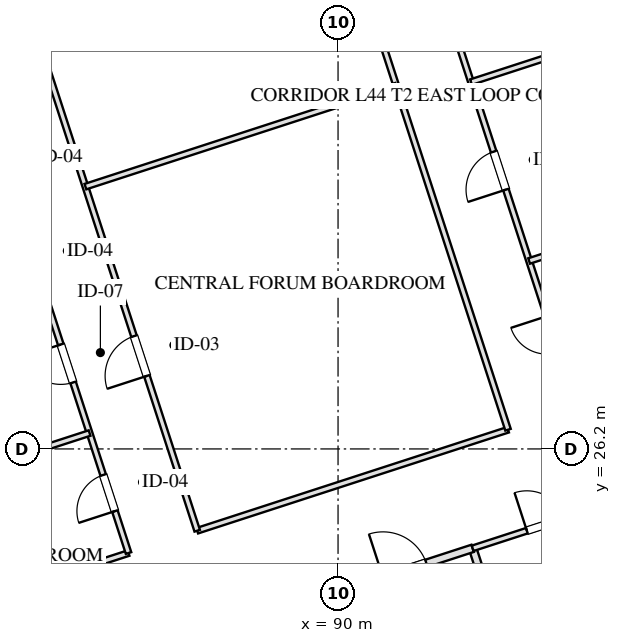
"""IFC4 building model, lengths in metres.
Left out: names, types, materials, properties, quantities, classifications, styles, units other than length and angle.
Written with IfcOpenShell. Run it as: python <this file> out.ifc"""

import sys

from ifc_helpers import new_model, si_unit, direction, frame, frame_2d, origin, place, context, subcontext, project, spatial, rectangle, extrude, element, fill, save


model = new_model("IFC4")
c1 = context("Model", 3, precision=1e-05, world=origin(), true_north=direction((0.0, 1.0)))
c2 = subcontext(c1, "Body", "Model", "MODEL_VIEW")
j1 = project(units=[si_unit("LENGTHUNIT", "METRE"), si_unit("PLANEANGLEUNIT", "RADIAN")], contexts=[c1])
p1 = place(None, origin())
s1 = spatial("IfcSite", under=j1, at=p1, CompositionType="ELEMENT")
p2 = place(p1, origin())
s2 = spatial("IfcBuilding", under=s1, at=p2, CompositionType="ELEMENT")
p3 = place(p2, frame((0.0, 0.0, 166.75)))
s3 = spatial("IfcBuildingStorey", under=s2, at=p3, CompositionType="ELEMENT", Elevation=166.75)
p4 = place(p3, frame((93.542, 23.585, 0.0), z_axis=(0.0, 0.0, 1.0), x_axis=(0.309042196757, -0.951048327176, 0.0)))
e1 = element("IfcWall", 1, at=p4, inside=s3, PredefinedType="PARTITIONING", context=c2, shape_type="SweptSolid", body=[
    extrude(rectangle(XDim=8.43, YDim=0.2, at=frame_2d((4.215, 0.0))), origin(), (0.0, 0.0, 1.0), 3.175),
])
p5 = place(p3, frame((89.899, 22.401, 0.0), z_axis=(0.0, 0.0, 1.0), x_axis=(0.951046716504, 0.309047153403, 0.0)))
e2 = element("IfcWall", 2, at=p5, inside=s3, PredefinedType="PARTITIONING", context=c2, shape_type="SweptSolid", body=[
    extrude(rectangle(XDim=3.83, YDim=0.2, at=frame_2d((1.915, 0.0))), origin(), (0.0, 0.0, 1.0), 3.175),
])
p6 = place(p5, frame((1.35, 0.0, 0.0)))
e3 = element("IfcOpeningElement", 3, at=p6, cuts=e2, PredefinedType="OPENING", context=c2, shape_type="SweptSolid", body=[
    extrude(rectangle(XDim=1.2, YDim=2.05, at=frame_2d((0.6, 1.025))), frame((0.0, 0.11, 0.0), z_axis=(0.0, -1.0, 0.0), x_axis=(1.0, 0.0, 0.0)), (0.0, 0.0, 1.0), 0.22),
])
p7 = place(p3, frame((93.542, 23.585, 0.0), z_axis=(0.0, 0.0, 1.0), x_axis=(0.951063829732, 0.308994485023, 0.0)))
e4 = element("IfcWall", 4, at=p7, inside=s3, PredefinedType="PARTITIONING", context=c2, shape_type="SweptSolid", body=[
    extrude(rectangle(XDim=4.4, YDim=0.15, at=frame_2d((2.2, 0.0))), origin(), (0.0, 0.0, 1.0), 3.175),
])
p8 = place(p7, frame((1.5, 0.0, 0.0)))
e5 = element("IfcOpeningElement", 5, at=p8, cuts=e4, PredefinedType="OPENING", context=c2, shape_type="SweptSolid", body=[
    extrude(rectangle(XDim=1.05, YDim=2.05, at=frame_2d((0.525, 1.025))), frame((0.0, 0.085, 0.0), z_axis=(0.0, -1.0, 0.0), x_axis=(1.0, 0.0, 0.0)), (0.0, 0.0, 1.0), 0.17),
])
p9 = place(p3, frame((77.925, 21.328, 0.0), z_axis=(0.0, 0.0, 1.0), x_axis=(0.951061887302, 0.309000463626, 0.0)))
e6 = element("IfcWall", 6, at=p9, inside=s3, PredefinedType="PARTITIONING", context=c2, shape_type="SweptSolid", body=[
    extrude(rectangle(XDim=6.9, YDim=0.15, at=frame_2d((3.45, 0.0))), origin(), (0.0, 0.0, 1.0), 3.175),
])
p10 = place(p3, frame((86.294, 24.048, 0.0), z_axis=(0.0, 0.0, 1.0), x_axis=(0.951052008164, 0.309030868631, 0.0)))
e7 = element("IfcWall", 7, at=p10, inside=s3, PredefinedType="PARTITIONING", context=c2, shape_type="SweptSolid", body=[
    extrude(rectangle(XDim=8.6, YDim=0.15, at=frame_2d((4.3, 0.0))), origin(), (0.0, 0.0, 1.0), 3.175),
])
p11 = place(p3, frame((84.487, 23.46, 0.0), z_axis=(0.0, 0.0, 1.0), x_axis=(-0.30901773025, 0.951056277195, 0.0)))
e8 = element("IfcWall", 8, at=p11, inside=s3, PredefinedType="PARTITIONING", context=c2, shape_type="SweptSolid", body=[
    extrude(rectangle(XDim=16.64, YDim=0.15, at=frame_2d((8.32, 0.0))), origin(), (0.0, 0.0, 1.0), 3.175),
])
p12 = place(p11, frame((1.16, 0.0, 0.0)))
e9 = element("IfcOpeningElement", 9, at=p12, cuts=e8, PredefinedType="OPENING", context=c2, shape_type="SweptSolid", body=[
    extrude(rectangle(XDim=1.0, YDim=2.05, at=frame_2d((0.5, 1.025))), frame((0.0, 0.085, 0.0), z_axis=(0.0, -1.0, 0.0), x_axis=(1.0, 0.0, 0.0)), (0.0, 0.0, 1.0), 0.17),
])
p13 = place(p11, frame((4.72, 0.0, 0.0)))
e10 = element("IfcOpeningElement", 10, at=p13, cuts=e8, PredefinedType="OPENING", context=c2, shape_type="SweptSolid", body=[
    extrude(rectangle(XDim=1.05, YDim=2.05, at=frame_2d((0.525, 1.025))), frame((0.0, 0.085, 0.0), z_axis=(0.0, -1.0, 0.0), x_axis=(1.0, 0.0, 0.0)), (0.0, 0.0, 1.0), 0.17),
])
p14 = place(p11, frame((7.56, 0.0, 0.0)))
e11 = element("IfcOpeningElement", 11, at=p14, cuts=e8, PredefinedType="OPENING", context=c2, shape_type="SweptSolid", body=[
    extrude(rectangle(XDim=1.0, YDim=2.05, at=frame_2d((0.5, 1.025))), frame((0.0, 0.085, 0.0), z_axis=(0.0, -1.0, 0.0), x_axis=(1.0, 0.0, 0.0)), (0.0, 0.0, 1.0), 0.17),
])
p15 = place(p11, frame((10.16, 0.0, 0.0)))
e12 = element("IfcOpeningElement", 12, at=p15, cuts=e8, PredefinedType="OPENING", context=c2, shape_type="SweptSolid", body=[
    extrude(rectangle(XDim=1.0, YDim=2.05, at=frame_2d((0.5, 1.025))), frame((0.0, 0.085, 0.0), z_axis=(0.0, -1.0, 0.0), x_axis=(1.0, 0.0, 0.0)), (0.0, 0.0, 1.0), 0.17),
])
p16 = place(p11, frame((14.48, 0.0, 0.0)))
e13 = element("IfcOpeningElement", 13, at=p16, cuts=e8, PredefinedType="OPENING", context=c2, shape_type="SweptSolid", body=[
    extrude(rectangle(XDim=1.0, YDim=2.05, at=frame_2d((0.5, 1.025))), frame((0.0, 0.085, 0.0), z_axis=(0.0, -1.0, 0.0), x_axis=(1.0, 0.0, 0.0)), (0.0, 0.0, 1.0), 0.17),
])
p17 = place(p3, frame((86.294, 24.048, 0.0), z_axis=(0.0, 0.0, 1.0), x_axis=(-0.309004459387, 0.951060589068, 0.0)))
e14 = element("IfcWall", 14, at=p17, inside=s3, PredefinedType="PARTITIONING", context=c2, shape_type="SweptSolid", body=[
    extrude(rectangle(XDim=16.64, YDim=0.15, at=frame_2d((8.32, 0.0))), origin(), (0.0, 0.0, 1.0), 3.175),
])
p18 = place(p17, frame((4.284, 0.0, 0.0)))
e15 = element("IfcOpeningElement", 15, at=p18, cuts=e14, PredefinedType="OPENING", context=c2, shape_type="SweptSolid", body=[
    extrude(rectangle(XDim=1.1, YDim=2.05, at=frame_2d((0.55, 1.025))), frame((0.0, 0.085, 0.0), z_axis=(0.0, -1.0, 0.0), x_axis=(1.0, 0.0, 0.0)), (0.0, 0.0, 1.0), 0.17),
])
p19 = place(p17, frame((12.724, 0.0, 0.0)))
e16 = element("IfcOpeningElement", 16, at=p19, cuts=e14, PredefinedType="OPENING", context=c2, shape_type="SweptSolid", body=[
    extrude(rectangle(XDim=1.1, YDim=2.05, at=frame_2d((0.55, 1.025))), frame((0.0, 0.085, 0.0), z_axis=(0.0, -1.0, 0.0), x_axis=(1.0, 0.0, 0.0)), (0.0, 0.0, 1.0), 0.17),
])
p20 = place(p3, frame((94.473, 26.705, 0.0), z_axis=(0.0, 0.0, 1.0), x_axis=(-0.309022042254, 0.951054876125, 0.0)))
e17 = element("IfcWall", 17, at=p20, inside=s3, PredefinedType="PARTITIONING", context=c2, shape_type="SweptSolid", body=[
    extrude(rectangle(XDim=16.64, YDim=0.15, at=frame_2d((8.32, 0.0))), origin(), (0.0, 0.0, 1.0), 3.175),
])
p21 = place(p3, frame((96.28, 27.292, 0.0), z_axis=(0.0, 0.0, 1.0), x_axis=(-0.309008771245, 0.951059188113, 0.0)))
e18 = element("IfcWall", 18, at=p21, inside=s3, PredefinedType="PARTITIONING", context=c2, shape_type="SweptSolid", body=[
    extrude(rectangle(XDim=16.64, YDim=0.15, at=frame_2d((8.32, 0.0))), origin(), (0.0, 0.0, 1.0), 3.175),
])
p22 = place(p21, frame((1.526, 0.0, 0.0)))
e19 = element("IfcOpeningElement", 19, at=p22, cuts=e18, PredefinedType="OPENING", context=c2, shape_type="SweptSolid", body=[
    extrude(rectangle(XDim=1.0, YDim=2.05, at=frame_2d((0.5, 1.025))), frame((0.0, 0.085, 0.0), z_axis=(0.0, -1.0, 0.0), x_axis=(1.0, 0.0, 0.0)), (0.0, 0.0, 1.0), 0.17),
])
p23 = place(p21, frame((6.026, 0.0, 0.0)))
e20 = element("IfcOpeningElement", 20, at=p23, cuts=e18, PredefinedType="OPENING", context=c2, shape_type="SweptSolid", body=[
    extrude(rectangle(XDim=1.05, YDim=2.05, at=frame_2d((0.525, 1.025))), frame((0.0, 0.085, 0.0), z_axis=(0.0, -1.0, 0.0), x_axis=(1.0, 0.0, 0.0)), (0.0, 0.0, 1.0), 0.17),
])
p24 = place(p21, frame((10.519, 0.0, 0.0)))
e21 = element("IfcOpeningElement", 21, at=p24, cuts=e18, PredefinedType="OPENING", context=c2, shape_type="SweptSolid", body=[
    extrude(rectangle(XDim=1.0, YDim=2.05, at=frame_2d((0.5, 1.025))), frame((0.0, 0.085, 0.0), z_axis=(0.0, -1.0, 0.0), x_axis=(1.0, 0.0, 0.0)), (0.0, 0.0, 1.0), 0.17),
])
p25 = place(p21, frame((14.338, 0.0, 0.0)))
e22 = element("IfcOpeningElement", 22, at=p25, cuts=e18, PredefinedType="OPENING", context=c2, shape_type="SweptSolid", body=[
    extrude(rectangle(XDim=0.85, YDim=2.05, at=frame_2d((0.425, 1.025))), frame((0.0, 0.085, 0.0), z_axis=(0.0, -1.0, 0.0), x_axis=(1.0, 0.0, 0.0)), (0.0, 0.0, 1.0), 0.17),
])
p26 = place(p3, frame((83.352, 33.102, 0.0), z_axis=(0.0, 0.0, 1.0), x_axis=(0.951057640494, 0.309013534425, 0.0)))
e23 = element("IfcWall", 23, at=p26, inside=s3, PredefinedType="PARTITIONING", context=c2, shape_type="SweptSolid", body=[
    extrude(rectangle(XDim=8.6, YDim=0.15, at=frame_2d((4.3, 0.0))), origin(), (0.0, 0.0, 1.0), 3.175),
])
p27 = place(p3, frame((76.899, 24.486, 0.0), z_axis=(0.0, 0.0, 1.0), x_axis=(0.951051488548, 0.309032467762, 0.0)))
e24 = element("IfcWall", 24, at=p27, inside=s3, PredefinedType="PARTITIONING", context=c2, shape_type="SweptSolid", body=[
    extrude(rectangle(XDim=6.9, YDim=0.15, at=frame_2d((3.45, 0.0))), origin(), (0.0, 0.0, 1.0), 3.175),
])
p28 = place(p3, frame((95.028, 31.146, 0.0), z_axis=(0.0, 0.0, 1.0), x_axis=(0.951056999652, 0.309015506751, 0.0)))
e25 = element("IfcWall", 25, at=p28, inside=s3, PredefinedType="PARTITIONING", context=c2, shape_type="SweptSolid", body=[
    extrude(rectangle(XDim=11.5, YDim=0.15, at=frame_2d((5.75, 0.0))), origin(), (0.0, 0.0, 1.0), 3.175),
])
p29 = place(p3, frame((93.499, 35.852, 0.0), z_axis=(0.0, 0.0, 1.0), x_axis=(0.951054972381, 0.309021746015, 0.0)))
e26 = element("IfcWall", 26, at=p29, inside=s3, PredefinedType="PARTITIONING", context=c2, shape_type="SweptSolid", body=[
    extrude(rectangle(XDim=11.5, YDim=0.15, at=frame_2d((5.75, 0.0))), origin(), (0.0, 0.0, 1.0), 3.175),
])
p30 = place(p6, origin())
e27 = element("IfcDoor", 27, at=p30, inside=s3, OperationType="SINGLE_SWING_LEFT", PredefinedType="DOOR", context=c2, shape_type="SweptSolid", body=[
    extrude(rectangle(XDim=1.2, YDim=2.05, at=frame_2d((0.6, 1.025))), frame((0.0, 0.025, 0.0), z_axis=(0.0, -1.0, 0.0), x_axis=(1.0, 0.0, 0.0)), (0.0, 0.0, 1.0), 0.05),
])
fill(e3, e27)
p31 = place(p8, origin())
e28 = element("IfcDoor", 28, at=p31, inside=s3, OperationType="SINGLE_SWING_LEFT", PredefinedType="DOOR", context=c2, shape_type="SweptSolid", body=[
    extrude(rectangle(XDim=1.05, YDim=2.05, at=frame_2d((0.525, 1.025))), frame((0.0, 0.025, 0.0), z_axis=(0.0, -1.0, 0.0), x_axis=(1.0, 0.0, 0.0)), (0.0, 0.0, 1.0), 0.05),
])
fill(e5, e28)
p32 = place(p12, origin())
e29 = element("IfcDoor", 29, at=p32, inside=s3, OperationType="SINGLE_SWING_LEFT", PredefinedType="DOOR", context=c2, shape_type="SweptSolid", body=[
    extrude(rectangle(XDim=1.0, YDim=2.05, at=frame_2d((0.5, 1.025))), frame((0.0, 0.025, 0.0), z_axis=(0.0, -1.0, 0.0), x_axis=(1.0, 0.0, 0.0)), (0.0, 0.0, 1.0), 0.05),
])
fill(e9, e29)
p33 = place(p13, origin())
e30 = element("IfcDoor", 30, at=p33, inside=s3, OperationType="SINGLE_SWING_RIGHT", PredefinedType="DOOR", context=c2, shape_type="SweptSolid", body=[
    extrude(rectangle(XDim=1.05, YDim=2.05, at=frame_2d((0.525, 1.025))), frame((0.0, 0.025, 0.0), z_axis=(0.0, -1.0, 0.0), x_axis=(1.0, 0.0, 0.0)), (0.0, 0.0, 1.0), 0.05),
])
fill(e10, e30)
p34 = place(p18, origin())
e31 = element("IfcDoor", 31, at=p34, inside=s3, OperationType="SINGLE_SWING_LEFT", PredefinedType="DOOR", context=c2, shape_type="SweptSolid", body=[
    extrude(rectangle(XDim=1.1, YDim=2.05, at=frame_2d((0.55, 1.025))), frame((0.0, 0.025, 0.0), z_axis=(0.0, -1.0, 0.0), x_axis=(1.0, 0.0, 0.0)), (0.0, 0.0, 1.0), 0.05),
])
fill(e15, e31)
p35 = place(p23, origin())
e32 = element("IfcDoor", 32, at=p35, inside=s3, OperationType="SINGLE_SWING_LEFT", PredefinedType="DOOR", context=c2, shape_type="SweptSolid", body=[
    extrude(rectangle(XDim=1.05, YDim=2.05, at=frame_2d((0.525, 1.025))), frame((0.0, 0.025, 0.0), z_axis=(0.0, -1.0, 0.0), x_axis=(1.0, 0.0, 0.0)), (0.0, 0.0, 1.0), 0.05),
])
fill(e20, e32)
save(model, sys.argv[1])
